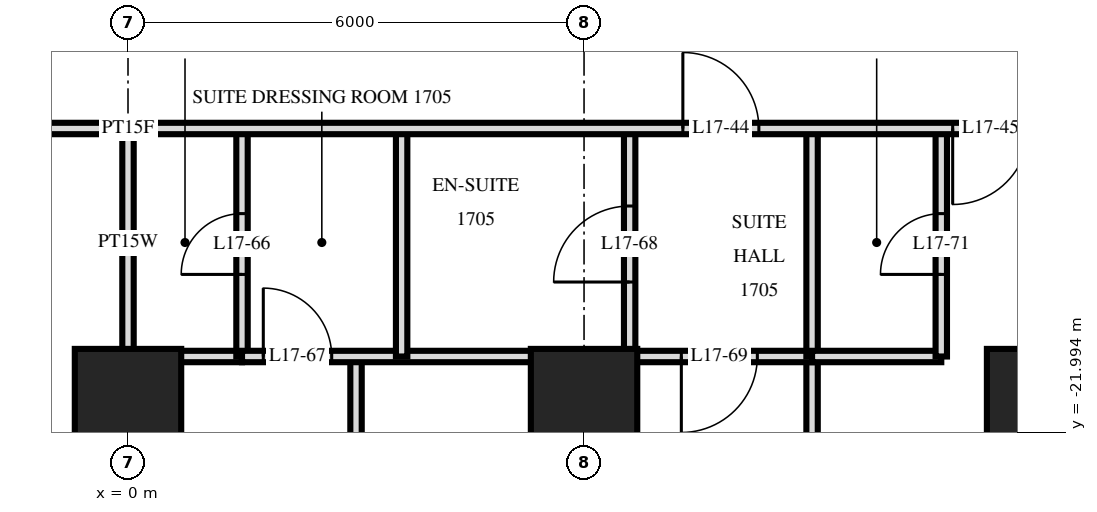
"""IFC4 building model, lengths in metres.
Left out: names, types, materials, properties, quantities, classifications, styles, units other than length and angle.
Written with IfcOpenShell. Run it as: python <this file> out.ifc"""

import sys

from ifc_helpers import new_model, si_unit, direction, frame, frame_2d, origin, origin_2d, place, context, subcontext, project, spatial, rectangle, extrude, element, fill, save


model = new_model("IFC4")
c1 = context("Model", 3, precision=1e-05, world=origin(), true_north=direction((0.0, 1.0)))
c2 = subcontext(c1, "Body", "Model", "MODEL_VIEW")
j1 = project(units=[si_unit("LENGTHUNIT", "METRE"), si_unit("PLANEANGLEUNIT", "RADIAN")], contexts=[c1])
p1 = place(None, origin())
s1 = spatial("IfcSite", under=j1, at=p1, CompositionType="ELEMENT")
p2 = place(p1, origin())
s2 = spatial("IfcBuilding", under=s1, at=p2, CompositionType="ELEMENT")
p3 = place(p2, frame((0.0, 0.0, 70.8)))
s3 = spatial("IfcBuildingStorey", under=s2, at=p3, CompositionType="ELEMENT", Elevation=70.8)
for number, where, z_axis, x_axis in (
    (1, (0.0, -21.6, 0.0), (0.0, 0.0, 1.0), (1.0, 0.0, 0.0)),
    (2, (6.0, -21.6, 0.0), (0.0, 0.0, 1.0), (1.0, 0.0, 0.0)),
    (3, (12.0, -21.6, 0.0), (0.0, 0.0, 1.0), (1.0, 0.0, 0.0)),
):
    element("IfcColumn", number, at=place(p3, frame(where, z_axis=z_axis, x_axis=x_axis)), inside=s3, PredefinedType="COLUMN", context=c2, shape_type="SweptSolid", body=[
        extrude(rectangle(XDim=1.4, YDim=1.4, at=origin_2d()), origin(), (0.0, 0.0, 1.0), 3.6),
    ])
p4 = place(p3, frame((10.7, -21.0, 0.0), z_axis=(0.0, 0.0, 1.0), x_axis=(0.0, 1.0, 0.0)))
e4 = element("IfcWall", 4, at=p4, inside=s3, PredefinedType="PARTITIONING", context=c2, shape_type="SweptSolid", body=[
    extrude(rectangle(XDim=3.0, YDim=0.15, at=frame_2d((1.5, 0.0))), origin(), (0.0, 0.0, 1.0), 3.32),
])
p5 = place(p4, frame((1.08, 0.0, 0.0)))
e5 = element("IfcOpeningElement", 5, at=p5, cuts=e4, PredefinedType="OPENING", context=c2, shape_type="SweptSolid", body=[
    extrude(rectangle(XDim=0.8, YDim=2.1, at=frame_2d((0.4, 1.05))), frame((0.0, 0.085, 0.0), z_axis=(0.0, -1.0, 0.0), x_axis=(1.0, 0.0, 0.0)), (0.0, 0.0, 1.0), 0.17),
])
p6 = place(p3, frame((9.0, -21.0, 0.0), z_axis=(0.0, 0.0, 1.0), x_axis=(0.0, 1.0, 0.0)))
e6 = element("IfcWall", 6, at=p6, inside=s3, PredefinedType="PARTITIONING", context=c2, shape_type="SweptSolid", body=[
    extrude(rectangle(XDim=3.0, YDim=0.15, at=frame_2d((1.5, 0.0))), origin(), (0.0, 0.0, 1.0), 3.32),
])
p7 = place(p3, frame((9.0, -29.22, 0.0), z_axis=(0.0, 0.0, 1.0), x_axis=(0.0, 1.0, 0.0)))
e7 = element("IfcWall", 7, at=p7, inside=s3, PredefinedType="PARTITIONING", context=c2, shape_type="SweptSolid", body=[
    extrude(rectangle(XDim=8.22, YDim=0.15, at=frame_2d((4.11, 0.0))), origin(), (0.0, 0.0, 1.0), 3.32),
])
p8 = place(p3, frame((6.6, -21.0, 0.0), z_axis=(0.0, 0.0, 1.0), x_axis=(0.0, 1.0, 0.0)))
e8 = element("IfcWall", 8, at=p8, inside=s3, PredefinedType="PARTITIONING", context=c2, shape_type="SweptSolid", body=[
    extrude(rectangle(XDim=3.0, YDim=0.15, at=frame_2d((1.5, 0.0))), origin(), (0.0, 0.0, 1.0), 3.32),
])
p9 = place(p8, frame((0.98, 0.0, 0.0)))
e9 = element("IfcOpeningElement", 9, at=p9, cuts=e8, PredefinedType="OPENING", context=c2, shape_type="SweptSolid", body=[
    extrude(rectangle(XDim=1.0, YDim=2.1, at=frame_2d((0.5, 1.05))), frame((0.0, 0.085, 0.0), z_axis=(0.0, -1.0, 0.0), x_axis=(1.0, 0.0, 0.0)), (0.0, 0.0, 1.0), 0.17),
])
p10 = place(p3, frame((3.6, -21.0, 0.0), z_axis=(0.0, 0.0, 1.0), x_axis=(0.0, 1.0, 0.0)))
e10 = element("IfcWall", 10, at=p10, inside=s3, PredefinedType="PARTITIONING", context=c2, shape_type="SweptSolid", body=[
    extrude(rectangle(XDim=3.0, YDim=0.15, at=frame_2d((1.5, 0.0))), origin(), (0.0, 0.0, 1.0), 3.32),
])
p11 = place(p3, frame((3.0, -29.22, 0.0), z_axis=(0.0, 0.0, 1.0), x_axis=(0.0, 1.0, 0.0)))
e11 = element("IfcWall", 11, at=p11, inside=s3, PredefinedType="PARTITIONING", context=c2, shape_type="SweptSolid", body=[
    extrude(rectangle(XDim=8.22, YDim=0.15, at=frame_2d((4.11, 0.0))), origin(), (0.0, 0.0, 1.0), 3.32),
])
p12 = place(p11, frame((3.57, 0.0, 0.0)))
e12 = element("IfcOpeningElement", 12, at=p12, cuts=e11, PredefinedType="OPENING", context=c2, shape_type="SweptSolid", body=[
    extrude(rectangle(XDim=0.9, YDim=2.1, at=frame_2d((0.45, 1.05))), frame((0.0, 0.085, 0.0), z_axis=(0.0, -1.0, 0.0), x_axis=(1.0, 0.0, 0.0)), (0.0, 0.0, 1.0), 0.17),
])
p13 = place(p3, frame((1.5, -21.0, 0.0), z_axis=(0.0, 0.0, 1.0), x_axis=(0.0, 1.0, 0.0)))
e13 = element("IfcWall", 13, at=p13, inside=s3, PredefinedType="PLUMBINGWALL", context=c2, shape_type="SweptSolid", body=[
    extrude(rectangle(XDim=3.0, YDim=0.15, at=frame_2d((1.5, 0.0))), origin(), (0.0, 0.0, 1.0), 3.32),
])
p14 = place(p13, frame((1.08, 0.0, 0.0)))
e14 = element("IfcOpeningElement", 14, at=p14, cuts=e13, PredefinedType="OPENING", context=c2, shape_type="SweptSolid", body=[
    extrude(rectangle(XDim=0.8, YDim=2.1, at=frame_2d((0.4, 1.05))), frame((0.0, 0.085, 0.0), z_axis=(0.0, -1.0, 0.0), x_axis=(1.0, 0.0, 0.0)), (0.0, 0.0, 1.0), 0.17),
])
p15 = place(p3, frame((0.0, -29.22, 0.0), z_axis=(0.0, 0.0, 1.0), x_axis=(0.0, 1.0, 0.0)))
e15 = element("IfcWall", 15, at=p15, inside=s3, PredefinedType="PARTITIONING", context=c2, shape_type="SweptSolid", body=[
    extrude(rectangle(XDim=8.22, YDim=0.15, at=frame_2d((4.11, 0.0))), origin(), (0.0, 0.0, 1.0), 3.32),
])
p16 = place(p3, frame((0.0, -21.0, 0.0), z_axis=(0.0, 0.0, 1.0), x_axis=(0.0, 1.0, 0.0)))
e16 = element("IfcWall", 16, at=p16, inside=s3, PredefinedType="PLUMBINGWALL", context=c2, shape_type="SweptSolid", body=[
    extrude(rectangle(XDim=3.0, YDim=0.15, at=frame_2d((1.5, 0.0))), origin(), (0.0, 0.0, 1.0), 3.32),
])
p17 = place(p3, frame((6.6, -21.0, 0.0), z_axis=(0.0, 0.0, 1.0), x_axis=(1.0, 0.0, 0.0)))
e17 = element("IfcWall", 17, at=p17, inside=s3, PredefinedType="PARTITIONING", context=c2, shape_type="SweptSolid", body=[
    extrude(rectangle(XDim=2.4, YDim=0.15, at=frame_2d((1.2, 0.0))), origin(), (0.0, 0.0, 1.0), 3.32),
])
p18 = place(p17, frame((0.68, 0.0, 0.0)))
e18 = element("IfcOpeningElement", 18, at=p18, cuts=e17, PredefinedType="OPENING", context=c2, shape_type="SweptSolid", body=[
    extrude(rectangle(XDim=1.0, YDim=2.1, at=frame_2d((0.5, 1.05))), frame((0.0, 0.085, 0.0), z_axis=(0.0, -1.0, 0.0), x_axis=(1.0, 0.0, 0.0)), (0.0, 0.0, 1.0), 0.17),
])
p19 = place(p3, frame((1.5, -21.0, 0.0), z_axis=(0.0, 0.0, 1.0), x_axis=(1.0, 0.0, 0.0)))
e19 = element("IfcWall", 19, at=p19, inside=s3, PredefinedType="PARTITIONING", context=c2, shape_type="SweptSolid", body=[
    extrude(rectangle(XDim=5.1, YDim=0.15, at=frame_2d((2.55, 0.0))), origin(), (0.0, 0.0, 1.0), 3.32),
])
p20 = place(p19, frame((0.28, 0.0, 0.0)))
e20 = element("IfcOpeningElement", 20, at=p20, cuts=e19, PredefinedType="OPENING", context=c2, shape_type="SweptSolid", body=[
    extrude(rectangle(XDim=0.9, YDim=2.1, at=frame_2d((0.45, 1.05))), frame((0.0, 0.085, 0.0), z_axis=(0.0, -1.0, 0.0), x_axis=(1.0, 0.0, 0.0)), (0.0, 0.0, 1.0), 0.17),
])
p21 = place(p3, frame((9.0, -21.0, 0.0), z_axis=(0.0, 0.0, 1.0), x_axis=(1.0, 0.0, 0.0)))
e21 = element("IfcWall", 21, at=p21, inside=s3, PredefinedType="PARTITIONING", context=c2, shape_type="SweptSolid", body=[
    extrude(rectangle(XDim=1.7, YDim=0.15, at=frame_2d((0.85, 0.0))), origin(), (0.0, 0.0, 1.0), 3.32),
])
p22 = place(p3, frame((0.0, -21.0, 0.0), z_axis=(0.0, 0.0, 1.0), x_axis=(1.0, 0.0, 0.0)))
e22 = element("IfcWall", 22, at=p22, inside=s3, PredefinedType="PLUMBINGWALL", context=c2, shape_type="SweptSolid", body=[
    extrude(rectangle(XDim=1.5, YDim=0.15, at=frame_2d((0.75, 0.0))), origin(), (0.0, 0.0, 1.0), 3.32),
])
p23 = place(p3, frame((-33.12, -18.0, 0.0), z_axis=(0.0, 0.0, 1.0), x_axis=(1.0, 0.0, 0.0)))
e23 = element("IfcWall", 23, at=p23, inside=s3, PredefinedType="PARTITIONING", context=c2, shape_type="SweptSolid", body=[
    extrude(rectangle(XDim=66.24, YDim=0.15, at=frame_2d((33.12, 0.0))), origin(), (0.0, 0.0, 1.0), 3.32),
])
p24 = place(p23, frame((15.27, 0.0, 0.0)))
e24 = element("IfcOpeningElement", 24, at=p24, cuts=e23, PredefinedType="OPENING", context=c2, shape_type="SweptSolid", body=[
    extrude(rectangle(XDim=1.0, YDim=2.1, at=frame_2d((0.5, 1.05))), frame((0.0, 0.085, 0.0), z_axis=(0.0, -1.0, 0.0), x_axis=(1.0, 0.0, 0.0)), (0.0, 0.0, 1.0), 0.17),
])
p25 = place(p23, frame((21.22, 0.0, 0.0)))
e25 = element("IfcOpeningElement", 25, at=p25, cuts=e23, PredefinedType="OPENING", context=c2, shape_type="SweptSolid", body=[
    extrude(rectangle(XDim=1.0, YDim=2.1, at=frame_2d((0.5, 1.05))), frame((0.0, 0.085, 0.0), z_axis=(0.0, -1.0, 0.0), x_axis=(1.0, 0.0, 0.0)), (0.0, 0.0, 1.0), 0.17),
])
p26 = place(p23, frame((24.27, 0.0, 0.0)))
e26 = element("IfcOpeningElement", 26, at=p26, cuts=e23, PredefinedType="OPENING", context=c2, shape_type="SweptSolid", body=[
    extrude(rectangle(XDim=1.0, YDim=2.1, at=frame_2d((0.5, 1.05))), frame((0.0, 0.085, 0.0), z_axis=(0.0, -1.0, 0.0), x_axis=(1.0, 0.0, 0.0)), (0.0, 0.0, 1.0), 0.17),
])
p27 = place(p23, frame((30.97, 0.0, 0.0)))
e27 = element("IfcOpeningElement", 27, at=p27, cuts=e23, PredefinedType="OPENING", context=c2, shape_type="SweptSolid", body=[
    extrude(rectangle(XDim=1.0, YDim=2.1, at=frame_2d((0.5, 1.05))), frame((0.0, 0.085, 0.0), z_axis=(0.0, -1.0, 0.0), x_axis=(1.0, 0.0, 0.0)), (0.0, 0.0, 1.0), 0.17),
])
p28 = place(p23, frame((40.42, 0.0, 0.0)))
e28 = element("IfcOpeningElement", 28, at=p28, cuts=e23, PredefinedType="OPENING", context=c2, shape_type="SweptSolid", body=[
    extrude(rectangle(XDim=1.0, YDim=2.1, at=frame_2d((0.5, 1.05))), frame((0.0, 0.085, 0.0), z_axis=(0.0, -1.0, 0.0), x_axis=(1.0, 0.0, 0.0)), (0.0, 0.0, 1.0), 0.17),
])
p29 = place(p23, frame((43.97, 0.0, 0.0)))
e29 = element("IfcOpeningElement", 29, at=p29, cuts=e23, PredefinedType="OPENING", context=c2, shape_type="SweptSolid", body=[
    extrude(rectangle(XDim=1.0, YDim=2.1, at=frame_2d((0.5, 1.05))), frame((0.0, 0.085, 0.0), z_axis=(0.0, -1.0, 0.0), x_axis=(1.0, 0.0, 0.0)), (0.0, 0.0, 1.0), 0.17),
])
p30 = place(p23, frame((45.52, 0.0, 0.0)))
e30 = element("IfcOpeningElement", 30, at=p30, cuts=e23, PredefinedType="OPENING", context=c2, shape_type="SweptSolid", body=[
    extrude(rectangle(XDim=1.0, YDim=2.1, at=frame_2d((0.5, 1.05))), frame((0.0, 0.085, 0.0), z_axis=(0.0, -1.0, 0.0), x_axis=(1.0, 0.0, 0.0)), (0.0, 0.0, 1.0), 0.17),
])
p31 = place(p23, frame((52.97, 0.0, 0.0)))
e31 = element("IfcOpeningElement", 31, at=p31, cuts=e23, PredefinedType="OPENING", context=c2, shape_type="SweptSolid", body=[
    extrude(rectangle(XDim=1.0, YDim=2.1, at=frame_2d((0.5, 1.05))), frame((0.0, 0.085, 0.0), z_axis=(0.0, -1.0, 0.0), x_axis=(1.0, 0.0, 0.0)), (0.0, 0.0, 1.0), 0.17),
])
p32 = place(p23, frame((54.27, 0.0, 0.0)))
e32 = element("IfcOpeningElement", 32, at=p32, cuts=e23, PredefinedType="OPENING", context=c2, shape_type="SweptSolid", body=[
    extrude(rectangle(XDim=1.0, YDim=2.1, at=frame_2d((0.5, 1.05))), frame((0.0, 0.085, 0.0), z_axis=(0.0, -1.0, 0.0), x_axis=(1.0, 0.0, 0.0)), (0.0, 0.0, 1.0), 0.17),
])
p33 = place(p23, frame((13.42, 0.0, 0.0)))
e33 = element("IfcOpeningElement", 33, at=p33, cuts=e23, PredefinedType="OPENING", context=c2, shape_type="SweptSolid", body=[
    extrude(rectangle(XDim=1.0, YDim=2.1, at=frame_2d((0.5, 1.05))), frame((0.0, 0.085, 0.0), z_axis=(0.0, -1.0, 0.0), x_axis=(1.0, 0.0, 0.0)), (0.0, 0.0, 1.0), 0.17),
])
p34 = place(p23, frame((60.82, 0.0, 0.0)))
e34 = element("IfcOpeningElement", 34, at=p34, cuts=e23, PredefinedType="OPENING", context=c2, shape_type="SweptSolid", body=[
    extrude(rectangle(XDim=1.0, YDim=2.1, at=frame_2d((0.5, 1.05))), frame((0.0, 0.085, 0.0), z_axis=(0.0, -1.0, 0.0), x_axis=(1.0, 0.0, 0.0)), (0.0, 0.0, 1.0), 0.17),
])
p35 = place(p28, origin())
e35 = element("IfcDoor", 35, at=p35, inside=s3, OperationType="SINGLE_SWING_RIGHT", PredefinedType="DOOR", context=c2, shape_type="SweptSolid", body=[
    extrude(rectangle(XDim=1.0, YDim=2.1, at=frame_2d((0.5, 1.05))), frame((0.0, 0.025, 0.0), z_axis=(0.0, -1.0, 0.0), x_axis=(1.0, 0.0, 0.0)), (0.0, 0.0, 1.0), 0.05),
])
fill(e28, e35)
p36 = place(p29, frame((0.5, 0.0, 0.0), z_axis=(0.0, 0.0, 1.0), x_axis=(-1.0, 0.0, 0.0)))
e36 = element("IfcDoor", 36, at=p36, inside=s3, OperationType="SINGLE_SWING_LEFT", PredefinedType="DOOR", context=c2, shape_type="SweptSolid", body=[
    extrude(rectangle(XDim=1.0, YDim=2.1, at=frame_2d((0.0, 1.05))), frame((0.0, -0.025, 0.0), z_axis=(0.0, 1.0, 0.0), x_axis=(-1.0, 0.0, 0.0)), (0.0, 0.0, 1.0), 0.05),
])
fill(e29, e36)
p37 = place(p14, origin())
e37 = element("IfcDoor", 37, at=p37, inside=s3, OperationType="SINGLE_SWING_RIGHT", PredefinedType="DOOR", context=c2, shape_type="SweptSolid", body=[
    extrude(rectangle(XDim=0.8, YDim=2.1, at=frame_2d((0.4, 1.05))), frame((0.0, 0.025, 0.0), z_axis=(0.0, -1.0, 0.0), x_axis=(1.0, 0.0, 0.0)), (0.0, 0.0, 1.0), 0.05),
])
fill(e14, e37)
p38 = place(p20, origin())
e38 = element("IfcDoor", 38, at=p38, inside=s3, OperationType="SINGLE_SWING_RIGHT", PredefinedType="DOOR", context=c2, shape_type="SweptSolid", body=[
    extrude(rectangle(XDim=0.9, YDim=2.1, at=frame_2d((0.45, 1.05))), frame((0.0, 0.025, 0.0), z_axis=(0.0, -1.0, 0.0), x_axis=(1.0, 0.0, 0.0)), (0.0, 0.0, 1.0), 0.05),
])
fill(e20, e38)
p39 = place(p9, origin())
e39 = element("IfcDoor", 39, at=p39, inside=s3, OperationType="SINGLE_SWING_RIGHT", PredefinedType="DOOR", context=c2, shape_type="SweptSolid", body=[
    extrude(rectangle(XDim=1.0, YDim=2.1, at=frame_2d((0.5, 1.05))), frame((0.0, 0.025, 0.0), z_axis=(0.0, -1.0, 0.0), x_axis=(1.0, 0.0, 0.0)), (0.0, 0.0, 1.0), 0.05),
])
fill(e9, e39)
p40 = place(p18, frame((0.5, 0.0, 0.0), z_axis=(0.0, 0.0, 1.0), x_axis=(-1.0, 0.0, 0.0)))
e40 = element("IfcDoor", 40, at=p40, inside=s3, OperationType="SINGLE_SWING_LEFT", PredefinedType="DOOR", context=c2, shape_type="SweptSolid", body=[
    extrude(rectangle(XDim=1.0, YDim=2.1, at=frame_2d((0.0, 1.05))), frame((0.0, -0.025, 0.0), z_axis=(0.0, 1.0, 0.0), x_axis=(-1.0, 0.0, 0.0)), (0.0, 0.0, 1.0), 0.05),
])
fill(e18, e40)
p41 = place(p5, origin())
e41 = element("IfcDoor", 41, at=p41, inside=s3, OperationType="SINGLE_SWING_RIGHT", PredefinedType="DOOR", context=c2, shape_type="SweptSolid", body=[
    extrude(rectangle(XDim=0.8, YDim=2.1, at=frame_2d((0.4, 1.05))), frame((0.0, 0.025, 0.0), z_axis=(0.0, -1.0, 0.0), x_axis=(1.0, 0.0, 0.0)), (0.0, 0.0, 1.0), 0.05),
])
fill(e5, e41)
save(model, sys.argv[1])
